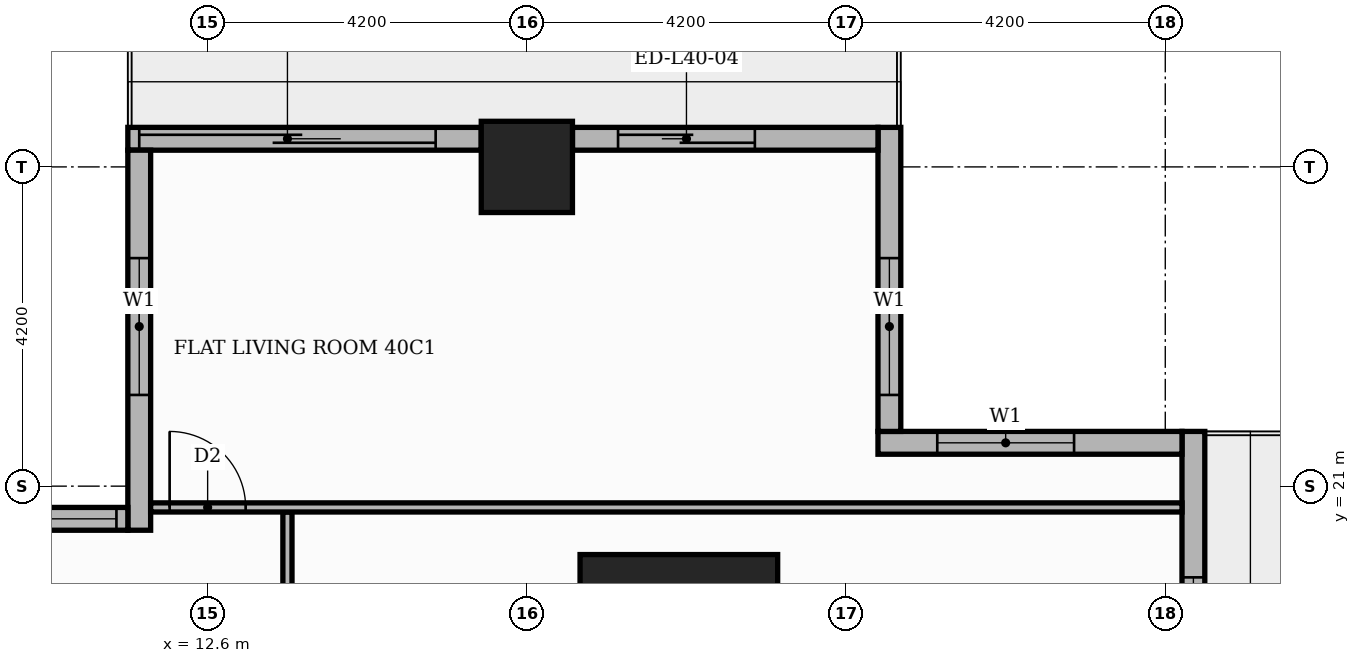
"""IFC4 building model, lengths in metres.
Left out: names, types, materials, properties, quantities, classifications, styles, units other than length and angle.
Written with IfcOpenShell. Run it as: python <this file> out.ifc"""

import sys

from ifc_helpers import new_model, si_unit, direction, frame, frame_2d, origin, origin_2d, place, context, subcontext, project, spatial, rectangle, extrude, element, fill, save


model = new_model("IFC4")
c1 = context("Model", 3, precision=1e-05, world=origin(), true_north=direction((0.0, 1.0)))
c2 = subcontext(c1, "Body", "Model", "MODEL_VIEW")
j1 = project(units=[si_unit("LENGTHUNIT", "METRE"), si_unit("PLANEANGLEUNIT", "RADIAN")], contexts=[c1])
p1 = place(None, origin())
s1 = spatial("IfcSite", under=j1, at=p1, CompositionType="ELEMENT")
p2 = place(p1, origin())
s2 = spatial("IfcBuilding", under=s1, at=p2, CompositionType="ELEMENT")
p3 = place(p2, frame((0.0, 0.0, 168.9)))
s3 = spatial("IfcBuildingStorey", under=s2, at=p3, CompositionType="ELEMENT", Elevation=168.9)
p4 = place(p3, frame((18.8, 18.8, 0.0), z_axis=(0.0, 0.0, 1.0), x_axis=(1.0, 0.0, 0.0)))
e1 = element("IfcColumn", 1, at=p4, inside=s3, PredefinedType="COLUMN", context=c2, shape_type="SweptSolid", body=[
    extrude(rectangle(XDim=2.6, YDim=2.6, at=origin_2d()), origin(), (0.0, 0.0, 1.0), 3.9),
])
p5 = place(p3, frame((16.8, 25.2, 0.0), z_axis=(0.0, 0.0, 1.0), x_axis=(1.0, 0.0, 0.0)))
e2 = element("IfcColumn", 2, at=p5, inside=s3, PredefinedType="COLUMN", context=c2, shape_type="SweptSolid", body=[
    extrude(rectangle(XDim=1.2, YDim=1.2, at=origin_2d()), origin(), (0.0, 0.0, 1.0), 3.9),
])
p6 = place(p3, frame((25.57, 17.4, 0.0), z_axis=(0.0, 0.0, 1.0), x_axis=(0.0, 1.0, 0.0)))
e3 = element("IfcWall", 3, at=p6, inside=s3, PredefinedType="STANDARD", context=c2, shape_type="SweptSolid", body=[
    extrude(rectangle(XDim=4.32, YDim=0.3, at=frame_2d((2.16, 0.0))), origin(), (0.0, 0.0, 1.0), 3.48),
])
p7 = place(p6, frame((0.6, 0.0, 0.9)))
e4 = element("IfcOpeningElement", 4, at=p7, cuts=e3, PredefinedType="OPENING", context=c2, shape_type="SweptSolid", body=[
    extrude(rectangle(XDim=1.8, YDim=2.1, at=frame_2d((0.9, 1.05))), frame((0.0, 0.16, 0.0), z_axis=(0.0, -1.0, 0.0), x_axis=(1.0, 0.0, 0.0)), (0.0, 0.0, 1.0), 0.32),
])
p8 = place(p3, frame((25.42, 21.57, 0.0), z_axis=(0.0, 0.0, 1.0), x_axis=(-1.0, 0.0, 0.0)))
e5 = element("IfcWall", 5, at=p8, inside=s3, PredefinedType="STANDARD", context=c2, shape_type="SweptSolid", body=[
    extrude(rectangle(XDim=4.0, YDim=0.3, at=frame_2d((2.0, 0.0))), origin(), (0.0, 0.0, 1.0), 3.48),
])
p9 = place(p8, frame((1.42, 0.0, 0.9)))
e6 = element("IfcOpeningElement", 6, at=p9, cuts=e5, PredefinedType="OPENING", context=c2, shape_type="SweptSolid", body=[
    extrude(rectangle(XDim=1.8, YDim=2.1, at=frame_2d((0.9, 1.05))), frame((0.0, 0.16, 0.0), z_axis=(0.0, -1.0, 0.0), x_axis=(1.0, 0.0, 0.0)), (0.0, 0.0, 1.0), 0.32),
])
p10 = place(p3, frame((21.57, 21.72, 0.0), z_axis=(0.0, 0.0, 1.0), x_axis=(0.0, 1.0, 0.0)))
e7 = element("IfcWall", 7, at=p10, inside=s3, PredefinedType="STANDARD", context=c2, shape_type="SweptSolid", body=[
    extrude(rectangle(XDim=4.0, YDim=0.3, at=frame_2d((2.0, 0.0))), origin(), (0.0, 0.0, 1.0), 3.48),
])
p11 = place(p10, frame((0.48, 0.0, 0.9)))
e8 = element("IfcOpeningElement", 8, at=p11, cuts=e7, PredefinedType="OPENING", context=c2, shape_type="SweptSolid", body=[
    extrude(rectangle(XDim=1.8, YDim=2.1, at=frame_2d((0.9, 1.05))), frame((0.0, 0.16, 0.0), z_axis=(0.0, -1.0, 0.0), x_axis=(1.0, 0.0, 0.0)), (0.0, 0.0, 1.0), 0.32),
])
p12 = place(p3, frame((21.42, 25.57, 0.0), z_axis=(0.0, 0.0, 1.0), x_axis=(-1.0, 0.0, 0.0)))
e9 = element("IfcWall", 9, at=p12, inside=s3, PredefinedType="STANDARD", context=c2, shape_type="SweptSolid", body=[
    extrude(rectangle(XDim=4.02, YDim=0.3, at=frame_2d((2.01, 0.0))), origin(), (0.0, 0.0, 1.0), 3.48),
])
p13 = place(p12, frame((1.62, 0.0, 0.0)))
e10 = element("IfcOpeningElement", 10, at=p13, cuts=e9, PredefinedType="OPENING", context=c2, shape_type="SweptSolid", body=[
    extrude(rectangle(XDim=1.8, YDim=2.4, at=frame_2d((0.9, 1.2))), frame((0.0, 0.16, 0.0), z_axis=(0.0, -1.0, 0.0), x_axis=(1.0, 0.0, 0.0)), (0.0, 0.0, 1.0), 0.32),
])
p14 = place(p3, frame((16.2, 25.57, 0.0), z_axis=(0.0, 0.0, 1.0), x_axis=(-1.0, 0.0, 0.0)))
e11 = element("IfcWall", 11, at=p14, inside=s3, PredefinedType="STANDARD", context=c2, shape_type="SweptSolid", body=[
    extrude(rectangle(XDim=4.65, YDim=0.3, at=frame_2d((2.325, 0.0))), origin(), (0.0, 0.0, 1.0), 3.48),
])
p15 = place(p14, frame((0.6, 0.0, 0.0)))
e12 = element("IfcOpeningElement", 12, at=p15, cuts=e11, PredefinedType="OPENING", context=c2, shape_type="SweptSolid", body=[
    extrude(rectangle(XDim=3.9, YDim=2.4, at=frame_2d((1.95, 1.2))), frame((0.0, 0.16, 0.0), z_axis=(0.0, -1.0, 0.0), x_axis=(1.0, 0.0, 0.0)), (0.0, 0.0, 1.0), 0.32),
])
p16 = place(p3, frame((11.7, 25.42, 0.0), z_axis=(0.0, 0.0, 1.0), x_axis=(0.0, -1.0, 0.0)))
e13 = element("IfcWall", 13, at=p16, inside=s3, PredefinedType="STANDARD", context=c2, shape_type="SweptSolid", body=[
    extrude(rectangle(XDim=5.0, YDim=0.3, at=frame_2d((2.5, 0.0))), origin(), (0.0, 0.0, 1.0), 3.48),
])
p17 = place(p16, frame((1.42, 0.0, 0.9)))
e14 = element("IfcOpeningElement", 14, at=p17, cuts=e13, PredefinedType="OPENING", context=c2, shape_type="SweptSolid", body=[
    extrude(rectangle(XDim=1.8, YDim=2.1, at=frame_2d((0.9, 1.05))), frame((0.0, 0.16, 0.0), z_axis=(0.0, -1.0, 0.0), x_axis=(1.0, 0.0, 0.0)), (0.0, 0.0, 1.0), 0.32),
])
p18 = place(p3, frame((11.55, 20.57, 0.0), z_axis=(0.0, 0.0, 1.0), x_axis=(-1.0, 0.0, 0.0)))
e15 = element("IfcWall", 15, at=p18, inside=s3, PredefinedType="STANDARD", context=c2, shape_type="SweptSolid", body=[
    extrude(rectangle(XDim=23.4, YDim=0.3, at=frame_2d((11.7, 0.0))), origin(), (0.0, 0.0, 1.0), 3.48),
])
p19 = place(p18, frame((0.15, 0.0, 0.9)))
e16 = element("IfcOpeningElement", 16, at=p19, cuts=e15, PredefinedType="OPENING", context=c2, shape_type="SweptSolid", body=[
    extrude(rectangle(XDim=6.0, YDim=2.1, at=frame_2d((3.0, 1.05))), frame((0.0, 0.16, 0.0), z_axis=(0.0, -1.0, 0.0), x_axis=(1.0, 0.0, 0.0)), (0.0, 0.0, 1.0), 0.32),
])
p20 = place(p18, frame((6.45, 0.0, 0.9)))
e17 = element("IfcOpeningElement", 17, at=p20, cuts=e15, PredefinedType="OPENING", context=c2, shape_type="SweptSolid", body=[
    extrude(rectangle(XDim=6.0, YDim=2.1, at=frame_2d((3.0, 1.05))), frame((0.0, 0.16, 0.0), z_axis=(0.0, -1.0, 0.0), x_axis=(1.0, 0.0, 0.0)), (0.0, 0.0, 1.0), 0.32),
])
p21 = place(p18, frame((12.75, 0.0, 0.9)))
e18 = element("IfcOpeningElement", 18, at=p21, cuts=e15, PredefinedType="OPENING", context=c2, shape_type="SweptSolid", body=[
    extrude(rectangle(XDim=6.0, YDim=2.1, at=frame_2d((3.0, 1.05))), frame((0.0, 0.16, 0.0), z_axis=(0.0, -1.0, 0.0), x_axis=(1.0, 0.0, 0.0)), (0.0, 0.0, 1.0), 0.32),
])
p22 = place(p18, frame((19.05, 0.0, 0.9)))
e19 = element("IfcOpeningElement", 19, at=p22, cuts=e15, PredefinedType="OPENING", context=c2, shape_type="SweptSolid", body=[
    extrude(rectangle(XDim=3.9, YDim=2.1, at=frame_2d((1.95, 1.05))), frame((0.0, 0.16, 0.0), z_axis=(0.0, -1.0, 0.0), x_axis=(1.0, 0.0, 0.0)), (0.0, 0.0, 1.0), 0.32),
])
p23 = place(p3, frame((13.65, 13.75, 0.0), z_axis=(0.0, 0.0, 1.0), x_axis=(0.0, 1.0, 0.0)))
e20 = element("IfcWall", 20, at=p23, inside=s3, PredefinedType="PARTITIONING", context=c2, shape_type="SweptSolid", body=[
    extrude(rectangle(XDim=6.91, YDim=0.12, at=frame_2d((3.455, 0.0))), origin(), (0.0, 0.0, 1.0), 3.48),
])
p24 = place(p23, frame((2.985, 0.0, 0.0)))
e21 = element("IfcOpeningElement", 21, at=p24, cuts=e20, PredefinedType="OPENING", context=c2, shape_type="SweptSolid", body=[
    extrude(rectangle(XDim=0.9, YDim=2.1, at=frame_2d((0.45, 1.05))), frame((0.0, 0.07, 0.0), z_axis=(0.0, -1.0, 0.0), x_axis=(1.0, 0.0, 0.0)), (0.0, 0.0, 1.0), 0.14),
])
p25 = place(p3, frame((11.85, 20.72, 0.0), z_axis=(0.0, 0.0, 1.0), x_axis=(1.0, 0.0, 0.0)))
e22 = element("IfcWall", 22, at=p25, inside=s3, PredefinedType="PARTITIONING", context=c2, shape_type="SweptSolid", body=[
    extrude(rectangle(XDim=13.57, YDim=0.12, at=frame_2d((6.785, 0.0))), origin(), (0.0, 0.0, 1.0), 3.48),
])
p26 = place(p25, frame((0.25, 0.0, 0.0)))
e23 = element("IfcOpeningElement", 23, at=p26, cuts=e22, PredefinedType="OPENING", context=c2, shape_type="SweptSolid", body=[
    extrude(rectangle(XDim=1.0, YDim=2.1, at=frame_2d((0.5, 1.05))), frame((0.0, 0.07, 0.0), z_axis=(0.0, -1.0, 0.0), x_axis=(1.0, 0.0, 0.0)), (0.0, 0.0, 1.0), 0.14),
])
p27 = place(p7, origin())
e24 = element("IfcWindow", 24, at=p27, inside=s3, PartitioningType="SINGLE_PANEL", PredefinedType="WINDOW", context=c2, shape_type="SweptSolid", body=[
    extrude(rectangle(XDim=1.8, YDim=2.1, at=frame_2d((0.9, 1.05))), frame((0.0, 0.03, 0.0), z_axis=(0.0, -1.0, 0.0), x_axis=(1.0, 0.0, 0.0)), (0.0, 0.0, 1.0), 0.06),
])
fill(e4, e24)
p28 = place(p9, origin())
e25 = element("IfcWindow", 25, at=p28, inside=s3, PartitioningType="SINGLE_PANEL", PredefinedType="WINDOW", context=c2, shape_type="SweptSolid", body=[
    extrude(rectangle(XDim=1.8, YDim=2.1, at=frame_2d((0.9, 1.05))), frame((0.0, 0.03, 0.0), z_axis=(0.0, -1.0, 0.0), x_axis=(1.0, 0.0, 0.0)), (0.0, 0.0, 1.0), 0.06),
])
fill(e6, e25)
p29 = place(p11, origin())
e26 = element("IfcWindow", 26, at=p29, inside=s3, PartitioningType="SINGLE_PANEL", PredefinedType="WINDOW", context=c2, shape_type="SweptSolid", body=[
    extrude(rectangle(XDim=1.8, YDim=2.1, at=frame_2d((0.9, 1.05))), frame((0.0, 0.03, 0.0), z_axis=(0.0, -1.0, 0.0), x_axis=(1.0, 0.0, 0.0)), (0.0, 0.0, 1.0), 0.06),
])
fill(e8, e26)
p30 = place(p13, origin())
e27 = element("IfcDoor", 27, at=p30, inside=s3, OperationType="SLIDING_TO_RIGHT", PredefinedType="DOOR", context=c2, shape_type="SweptSolid", body=[
    extrude(rectangle(XDim=1.8, YDim=2.4, at=frame_2d((0.9, 1.2))), frame((0.0, 0.025, 0.0), z_axis=(0.0, -1.0, 0.0), x_axis=(1.0, 0.0, 0.0)), (0.0, 0.0, 1.0), 0.05),
])
fill(e10, e27)
p31 = place(p15, origin())
e28 = element("IfcDoor", 28, at=p31, inside=s3, OperationType="SLIDING_TO_LEFT", PredefinedType="DOOR", context=c2, shape_type="SweptSolid", body=[
    extrude(rectangle(XDim=3.9, YDim=2.4, at=frame_2d((1.95, 1.2))), frame((0.0, 0.025, 0.0), z_axis=(0.0, -1.0, 0.0), x_axis=(1.0, 0.0, 0.0)), (0.0, 0.0, 1.0), 0.05),
])
fill(e12, e28)
p32 = place(p17, origin())
e29 = element("IfcWindow", 29, at=p32, inside=s3, PartitioningType="SINGLE_PANEL", PredefinedType="WINDOW", context=c2, shape_type="SweptSolid", body=[
    extrude(rectangle(XDim=1.8, YDim=2.1, at=frame_2d((0.9, 1.05))), frame((0.0, 0.03, 0.0), z_axis=(0.0, -1.0, 0.0), x_axis=(1.0, 0.0, 0.0)), (0.0, 0.0, 1.0), 0.06),
])
fill(e14, e29)
p33 = place(p19, origin())
e30 = element("IfcWindow", 30, at=p33, inside=s3, PartitioningType="SINGLE_PANEL", PredefinedType="WINDOW", context=c2, shape_type="SweptSolid", body=[
    extrude(rectangle(XDim=6.0, YDim=2.1, at=frame_2d((3.0, 1.05))), frame((0.0, 0.03, 0.0), z_axis=(0.0, -1.0, 0.0), x_axis=(1.0, 0.0, 0.0)), (0.0, 0.0, 1.0), 0.06),
])
fill(e16, e30)
p34 = place(p26, origin())
e31 = element("IfcDoor", 31, at=p34, inside=s3, OperationType="SINGLE_SWING_LEFT", PredefinedType="DOOR", context=c2, shape_type="SweptSolid", body=[
    extrude(rectangle(XDim=1.0, YDim=2.1, at=frame_2d((0.5, 1.05))), frame((0.0, 0.025, 0.0), z_axis=(0.0, -1.0, 0.0), x_axis=(1.0, 0.0, 0.0)), (0.0, 0.0, 1.0), 0.05),
])
fill(e23, e31)
save(model, sys.argv[1])
